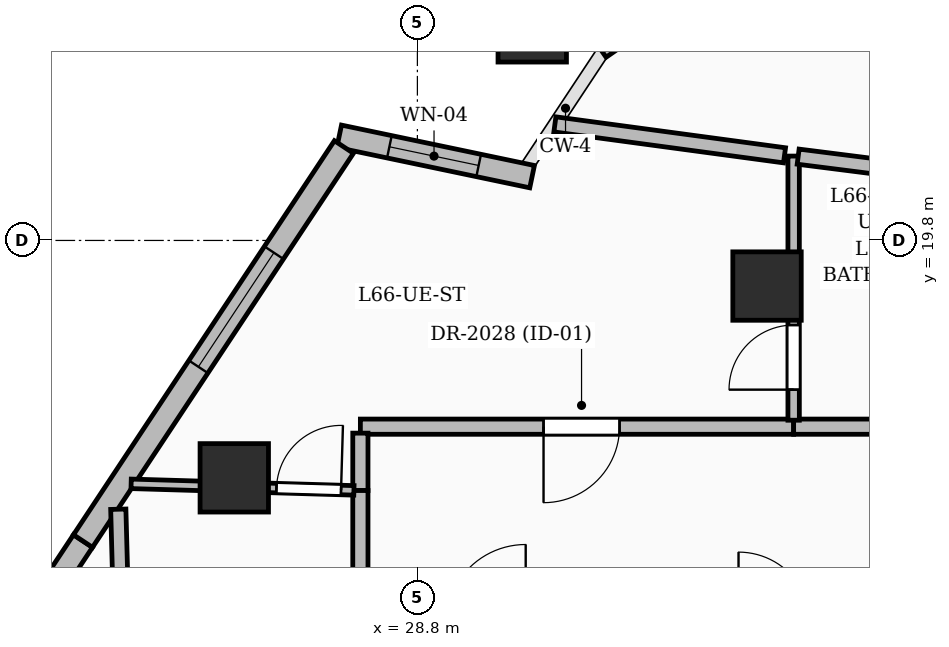
"""IFC4 building model, lengths in metres.
Left out: names, types, materials, properties, quantities, classifications, styles, units other than length and angle.
Written with IfcOpenShell. Run it as: python <this file> out.ifc"""

import sys

from ifc_helpers import new_model, si_unit, direction, frame, frame_2d, origin, origin_2d, place, context, subcontext, project, spatial, rectangle, extrude, element, fill, save


model = new_model("IFC4")
c1 = context("Model", 3, precision=1e-05, world=origin(), true_north=direction((0.0, 1.0)))
c2 = subcontext(c1, "Body", "Model", "MODEL_VIEW")
j1 = project(units=[si_unit("LENGTHUNIT", "METRE"), si_unit("PLANEANGLEUNIT", "RADIAN")], contexts=[c1])
p1 = place(None, origin())
s1 = spatial("IfcSite", under=j1, at=p1, CompositionType="ELEMENT")
p2 = place(p1, origin())
s2 = spatial("IfcBuilding", under=s1, at=p2, CompositionType="ELEMENT")
p3 = place(p2, frame((0.0, 0.0, 255.75)))
s3 = spatial("IfcBuildingStorey", under=s2, at=p3, CompositionType="ELEMENT", Elevation=255.75)
for number, where, z_axis, x_axis in (
    (1, (33.4, 19.2, 0.0), (0.0, 0.0, 1.0), (1.0, 0.0, 0.0)),
    (2, (30.311, 22.597, 0.0), (0.0, 0.0, 1.0), (1.0, 0.0, 0.0)),
    (3, (26.391, 16.677, 0.0), (0.0, 0.0, 1.0), (1.0, 0.0, 0.0)),
):
    element("IfcColumn", number, at=place(p3, frame(where, z_axis=z_axis, x_axis=x_axis)), inside=s3, PredefinedType="COLUMN", context=c2, shape_type="SweptSolid", body=[
        extrude(rectangle(XDim=0.9, YDim=0.9, at=origin_2d()), origin(), (0.0, 0.0, 1.0), 3.75),
    ])
p4 = place(p3, frame((27.771, 21.171, 0.0), z_axis=(0.0, 0.0, 1.0), x_axis=(0.978788869041, -0.204871544732, 0.0)))
e4 = element("IfcWall", 4, at=p4, inside=s3, PredefinedType="SOLIDWALL", context=c2, shape_type="SweptSolid", body=[
    extrude(rectangle(XDim=2.593, YDim=0.3, at=frame_2d((1.296, 0.0))), origin(), (0.0, 0.0, 1.0), 2.825),
])
p5 = place(p4, frame((0.675, 0.0, 0.8)))
e5 = element("IfcOpeningElement", 5, at=p5, cuts=e4, PredefinedType="OPENING", context=c2, shape_type="SweptSolid", body=[
    extrude(rectangle(XDim=1.2, YDim=1.8, at=frame_2d((0.6, 0.9))), frame((0.0, 0.16, 0.0), z_axis=(0.0, -1.0, 0.0), x_axis=(1.0, 0.0, 0.0)), (0.0, 0.0, 1.0), 0.32),
])
p6 = place(p3, frame((31.406, 22.296, 0.0), z_axis=(0.0, 0.0, 1.0), x_axis=(-0.570584534013, 0.821238874838, 0.0)))
e6 = element("IfcWall", 6, at=p6, inside=s3, PredefinedType="SOLIDWALL", context=c2, shape_type="SweptSolid", body=[
    extrude(rectangle(XDim=2.594, YDim=0.3, at=frame_2d((1.297, 0.0))), origin(), (0.0, 0.0, 1.0), 2.825),
])
p7 = place(p3, frame((20.816, 10.432, 0.0), z_axis=(0.0, 0.0, 1.0), x_axis=(0.552120304718, 0.833764456617, 0.0)))
e7 = element("IfcWall", 7, at=p7, inside=s3, PredefinedType="SOLIDWALL", context=c2, shape_type="SweptSolid", body=[
    extrude(rectangle(XDim=6.493, YDim=0.3, at=frame_2d((3.246, 0.0))), origin(), (0.0, 0.0, 1.0), 3.5),
])
p8 = place(p7, frame((2.517, 0.0, 0.0)))
e8 = element("IfcOpeningElement", 8, at=p8, cuts=e7, PredefinedType="OPENING", context=c2, shape_type="SweptSolid", body=[
    extrude(rectangle(XDim=1.0, YDim=2.2, at=frame_2d((0.5, 1.1))), frame((0.0, 0.16, 0.0), z_axis=(0.0, -1.0, 0.0), x_axis=(1.0, 0.0, 0.0)), (0.0, 0.0, 1.0), 0.32),
])
p9 = place(p3, frame((24.4, 15.845, 0.0), z_axis=(0.0, 0.0, 1.0), x_axis=(0.552142344765, 0.83374986124, 0.0)))
e9 = element("IfcWall", 9, at=p9, inside=s3, PredefinedType="SOLIDWALL", context=c2, shape_type="SweptSolid", body=[
    extrude(rectangle(XDim=6.218, YDim=0.3, at=frame_2d((3.109, 0.0))), origin(), (0.0, 0.0, 1.0), 3.5),
])
p10 = place(p9, frame((2.75, 0.0, 0.6)))
e10 = element("IfcOpeningElement", 10, at=p10, cuts=e9, PredefinedType="OPENING", context=c2, shape_type="SweptSolid", body=[
    extrude(rectangle(XDim=1.8, YDim=2.1, at=frame_2d((0.9, 1.05))), frame((0.0, 0.16, 0.0), z_axis=(0.0, -1.0, 0.0), x_axis=(1.0, 0.0, 0.0)), (0.0, 0.0, 1.0), 0.32),
])
p11 = place(p3, frame((33.75, 17.35, 0.0), z_axis=(0.0, 0.0, 1.0), x_axis=(-1.0, 0.0, 0.0)))
e11 = element("IfcWall", 11, at=p11, inside=s3, PredefinedType="PARTITIONING", context=c2, shape_type="SweptSolid", body=[
    extrude(rectangle(XDim=5.7, YDim=0.2, at=frame_2d((2.85, 0.0))), origin(), (0.0, 0.0, 1.0), 3.5),
])
p12 = place(p11, frame((2.29, 0.0, 0.0)))
e12 = element("IfcOpeningElement", 12, at=p12, cuts=e11, PredefinedType="OPENING", context=c2, shape_type="SweptSolid", body=[
    extrude(rectangle(XDim=1.0, YDim=2.2, at=frame_2d((0.5, 1.1))), frame((0.0, 0.11, 0.0), z_axis=(0.0, -1.0, 0.0), x_axis=(1.0, 0.0, 0.0)), (0.0, 0.0, 1.0), 0.22),
])
p13 = place(p3, frame((28.05, 17.265, 0.0), z_axis=(0.0, 0.0, 1.0), x_axis=(0.0, -1.0, 0.0)))
e13 = element("IfcWall", 13, at=p13, inside=s3, PredefinedType="PARTITIONING", context=c2, shape_type="SweptSolid", body=[
    extrude(rectangle(XDim=0.755, YDim=0.2, at=frame_2d((0.377, 0.0))), origin(), (0.0, 0.0, 1.0), 3.5),
])
p14 = place(p3, frame((28.05, 16.51, 0.0), z_axis=(0.0, 0.0, 1.0), x_axis=(0.0, -1.0, 0.0)))
e14 = element("IfcWall", 14, at=p14, inside=s3, PredefinedType="PARTITIONING", context=c2, shape_type="SweptSolid", body=[
    extrude(rectangle(XDim=1.46, YDim=0.2, at=frame_2d((0.73, 0.0))), origin(), (0.0, 0.0, 1.0), 3.5),
])
p15 = place(p3, frame((35.715, 17.35, 0.0), z_axis=(0.0, 0.0, 1.0), x_axis=(-1.0, 0.0, 0.0)))
e15 = element("IfcWall", 15, at=p15, inside=s3, PredefinedType="PARTITIONING", context=c2, shape_type="SweptSolid", body=[
    extrude(rectangle(XDim=1.965, YDim=0.2, at=frame_2d((0.982, 0.0))), origin(), (0.0, 0.0, 1.0), 2.685),
])
p16 = place(p3, frame((25.0, 11.3, 0.0), z_axis=(0.0, 0.0, 1.0), x_axis=(-0.027188450233, 0.999630325757, 0.0)))
e16 = element("IfcWall", 16, at=p16, inside=s3, PredefinedType="PARTITIONING", context=c2, shape_type="SweptSolid", body=[
    extrude(rectangle(XDim=4.966, YDim=0.2, at=frame_2d((2.483, 0.0))), origin(), (0.0, 0.0, 1.0), 2.82),
])
p17 = place(p16, frame((2.142, 0.0, 0.0)))
e17 = element("IfcOpeningElement", 17, at=p17, cuts=e16, PredefinedType="OPENING", context=c2, shape_type="SweptSolid", body=[
    extrude(rectangle(XDim=1.0, YDim=2.2, at=frame_2d((0.5, 1.1))), frame((0.0, 0.11, 0.0), z_axis=(0.0, -1.0, 0.0), x_axis=(1.0, 0.0, 0.0)), (0.0, 0.0, 1.0), 0.22),
])
p18 = place(p3, frame((25.034, 16.598, 0.0), z_axis=(0.0, 0.0, 1.0), x_axis=(0.999570484561, -0.029306081173, 0.0)))
e18 = element("IfcWall", 18, at=p18, inside=s3, PredefinedType="PARTITIONING", context=c2, shape_type="SweptSolid", body=[
    extrude(rectangle(XDim=2.932, YDim=0.125, at=frame_2d((1.466, 0.0))), origin(), (0.0, 0.0, 1.0), 3.5),
])
p19 = place(p18, frame((1.913, 0.0, 0.0)))
e19 = element("IfcOpeningElement", 19, at=p19, cuts=e18, PredefinedType="OPENING", context=c2, shape_type="SweptSolid", body=[
    extrude(rectangle(XDim=0.85, YDim=2.1, at=frame_2d((0.425, 1.05))), frame((0.0, 0.072, 0.0), z_axis=(0.0, -1.0, 0.0), x_axis=(1.0, 0.0, 0.0)), (0.0, 0.0, 1.0), 0.145),
])
p20 = place(p3, frame((33.75, 17.435, 0.0), z_axis=(0.0, 0.0, 1.0), x_axis=(0.0, 1.0, 0.0)))
e20 = element("IfcWall", 20, at=p20, inside=s3, PredefinedType="PARTITIONING", context=c2, shape_type="SweptSolid", body=[
    extrude(rectangle(XDim=3.475, YDim=0.15, at=frame_2d((1.737, 0.0))), origin(), (0.0, 0.0, 1.0), 2.685),
])
p21 = place(p20, frame((0.402, 0.0, 0.0)))
e21 = element("IfcOpeningElement", 21, at=p21, cuts=e20, PredefinedType="OPENING", context=c2, shape_type="SweptSolid", body=[
    extrude(rectangle(XDim=0.85, YDim=2.1, at=frame_2d((0.425, 1.05))), frame((0.0, 0.085, 0.0), z_axis=(0.0, -1.0, 0.0), x_axis=(1.0, 0.0, 0.0)), (0.0, 0.0, 1.0), 0.17),
])
p22 = place(p3, frame((33.63, 20.92, 0.0), z_axis=(0.0, 0.0, 1.0), x_axis=(-0.991047215952, 0.13351185623, 0.0)))
e22 = element("IfcWall", 22, at=p22, inside=s3, PredefinedType="PARTITIONING", context=c2, shape_type="SweptSolid", body=[
    extrude(rectangle(XDim=3.048, YDim=0.2, at=frame_2d((1.524, 0.0))), origin(), (0.0, 0.0, 1.0), 2.764),
])
p23 = place(p3, frame((35.716, 20.661, 0.0), z_axis=(0.0, 0.0, 1.0), x_axis=(-0.992041540235, 0.125911010037, 0.0)))
e23 = element("IfcWall", 23, at=p23, inside=s3, PredefinedType="PARTITIONING", context=c2, shape_type="SweptSolid", body=[
    extrude(rectangle(XDim=1.922, YDim=0.2, at=frame_2d((0.961, 0.0))), origin(), (0.0, 0.0, 1.0), 2.685),
])
p24 = place(p5, origin())
e24 = element("IfcWindow", 24, at=p24, inside=s3, PartitioningType="SINGLE_PANEL", PredefinedType="WINDOW", context=c2, shape_type="SweptSolid", body=[
    extrude(rectangle(XDim=1.2, YDim=1.8, at=frame_2d((0.6, 0.9))), frame((0.0, 0.03, 0.0), z_axis=(0.0, -1.0, 0.0), x_axis=(1.0, 0.0, 0.0)), (0.0, 0.0, 1.0), 0.06),
])
fill(e5, e24)
p25 = place(p10, origin())
e25 = element("IfcWindow", 25, at=p25, inside=s3, PartitioningType="SINGLE_PANEL", PredefinedType="WINDOW", context=c2, shape_type="SweptSolid", body=[
    extrude(rectangle(XDim=1.8, YDim=2.1, at=frame_2d((0.9, 1.05))), frame((0.0, 0.03, 0.0), z_axis=(0.0, -1.0, 0.0), x_axis=(1.0, 0.0, 0.0)), (0.0, 0.0, 1.0), 0.06),
])
fill(e10, e25)
p26 = place(p12, origin())
e26 = element("IfcDoor", 26, at=p26, inside=s3, OperationType="SINGLE_SWING_RIGHT", PredefinedType="DOOR", context=c2, shape_type="SweptSolid", body=[
    extrude(rectangle(XDim=1.0, YDim=2.2, at=frame_2d((0.5, 1.1))), frame((0.0, 0.025, 0.0), z_axis=(0.0, -1.0, 0.0), x_axis=(1.0, 0.0, 0.0)), (0.0, 0.0, 1.0), 0.05),
])
fill(e12, e26)
p27 = place(p19, origin())
e27 = element("IfcDoor", 27, at=p27, inside=s3, OperationType="SINGLE_SWING_RIGHT", PredefinedType="DOOR", context=c2, shape_type="SweptSolid", body=[
    extrude(rectangle(XDim=0.85, YDim=2.1, at=frame_2d((0.425, 1.05))), frame((0.0, 0.025, 0.0), z_axis=(0.0, -1.0, 0.0), x_axis=(1.0, 0.0, 0.0)), (0.0, 0.0, 1.0), 0.05),
])
fill(e19, e27)
p28 = place(p21, origin())
e28 = element("IfcDoor", 28, at=p28, inside=s3, OperationType="SINGLE_SWING_LEFT", PredefinedType="DOOR", context=c2, shape_type="SweptSolid", body=[
    extrude(rectangle(XDim=0.85, YDim=2.1, at=frame_2d((0.425, 1.05))), frame((0.0, 0.025, 0.0), z_axis=(0.0, -1.0, 0.0), x_axis=(1.0, 0.0, 0.0)), (0.0, 0.0, 1.0), 0.05),
])
fill(e21, e28)
save(model, sys.argv[1])
